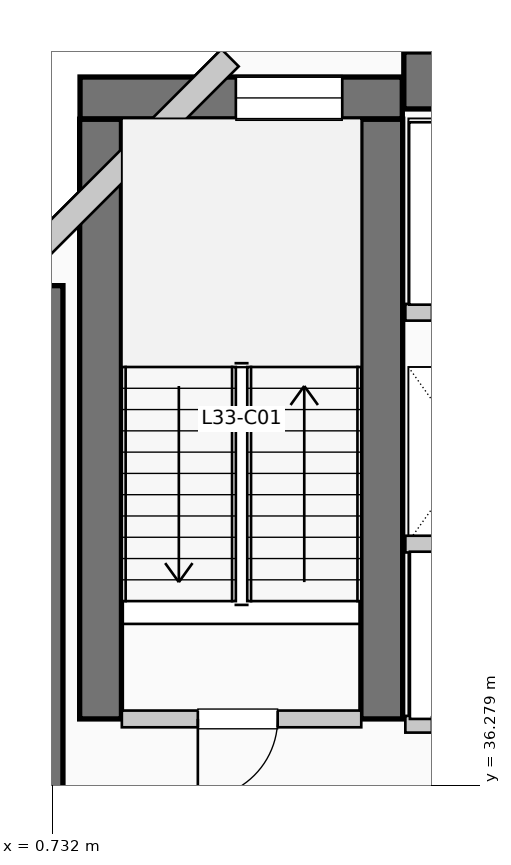
"""IFC4 building model, lengths in metres.
Left out: names, types, materials, properties, quantities, classifications, styles, units other than length and angle.
Written with IfcOpenShell. Run it as: python <this file> out.ifc"""

import sys

from ifc_helpers import new_model, si_unit, direction, frame, frame_2d, origin, place, context, subcontext, project, spatial, rectangle, extrude, element, fill, save


model = new_model("IFC4")
c1 = context("Model", 3, precision=1e-05, world=origin(), true_north=direction((0.0, 1.0)))
c2 = subcontext(c1, "Body", "Model", "MODEL_VIEW")
j1 = project(units=[si_unit("LENGTHUNIT", "METRE"), si_unit("PLANEANGLEUNIT", "RADIAN")], contexts=[c1])
p1 = place(None, origin())
s1 = spatial("IfcSite", under=j1, at=p1, CompositionType="ELEMENT")
p2 = place(p1, origin())
s2 = spatial("IfcBuilding", under=s1, at=p2, CompositionType="ELEMENT")
p3 = place(p2, frame((0.0, 0.0, 138.93)))
s3 = spatial("IfcBuildingStorey", under=s2, at=p3, CompositionType="ELEMENT", Elevation=138.93)
p4 = place(p3, frame((5.36, 45.55, 0.0), z_axis=(0.0, 0.0, 1.0), x_axis=(1.0, 0.0, 0.0)))
e1 = element("IfcWall", 1, at=p4, inside=s3, PredefinedType="SHEAR", context=c2, shape_type="SweptSolid", body=[
    extrude(rectangle(XDim=13.98, YDim=0.75, at=frame_2d((6.99, 0.0))), origin(), (0.0, 0.0, 1.0), 3.96),
])
p5 = place(p3, frame((0.5, 34.95, 0.0), z_axis=(0.0, 0.0, 1.0), x_axis=(0.0, 1.0, 0.0)))
e2 = element("IfcWall", 2, at=p5, inside=s3, PredefinedType="SHEAR", context=c2, shape_type="SweptSolid", body=[
    extrude(rectangle(XDim=7.9, YDim=0.75, at=frame_2d((3.95, 0.0))), origin(), (0.0, 0.0, 1.0), 3.96),
])
for number, where, z_axis, x_axis in (
    (3, (1.37, 37.15, 0.0), (0.0, 0.0, 1.0), (0.0, 1.0, 0.0)),
    (4, (5.07, 37.15, 0.0), (0.0, 0.0, 1.0), (0.0, 1.0, 0.0)),
):
    element("IfcWall", number, at=place(p3, frame(where, z_axis=z_axis, x_axis=x_axis)), inside=s3, PredefinedType="SHEAR", context=c2, shape_type="SweptSolid", body=[
        extrude(rectangle(XDim=7.89, YDim=0.55, at=frame_2d((3.945, 0.0))), origin(), (0.0, 0.0, 1.0), 3.96),
    ])
p6 = place(p3, frame((1.1, 45.32, 0.0), z_axis=(0.0, 0.0, 1.0), x_axis=(1.0, 0.0, 0.0)))
e5 = element("IfcWall", 5, at=p6, inside=s3, PredefinedType="SHEAR", context=c2, shape_type="SweptSolid", body=[
    extrude(rectangle(XDim=4.24, YDim=0.55, at=frame_2d((2.12, 0.0))), origin(), (0.0, 0.0, 1.0), 3.96),
])
p7 = place(p6, frame((2.05, 0.0, 1.05)))
e6 = element("IfcOpeningElement", 6, at=p7, cuts=e5, PredefinedType="OPENING", context=c2, shape_type="SweptSolid", body=[
    extrude(rectangle(XDim=1.4, YDim=1.8, at=frame_2d((0.7, 0.9))), frame((0.0, 0.285, 0.0), z_axis=(0.0, -1.0, 0.0), x_axis=(1.0, 0.0, 0.0)), (0.0, 0.0, 1.0), 0.57),
])
p8 = place(p3, frame((3.074, 45.848, 0.0), z_axis=(0.0, 0.0, 1.0), x_axis=(-0.707106781187, -0.707106781187, 0.0)))
e7 = element("IfcWall", 7, at=p8, inside=s3, PredefinedType="SOLIDWALL", context=c2, shape_type="SweptSolid", body=[
    extrude(rectangle(XDim=4.133, YDim=0.32, at=frame_2d((2.066, 0.0))), origin(), (0.0, 0.0, 1.0), 3.71),
])
p9 = place(p3, frame((1.65, 37.15, 0.0), z_axis=(0.0, 0.0, 1.0), x_axis=(1.0, 0.0, 0.0)))
e8 = element("IfcWall", 8, at=p9, inside=s3, PredefinedType="PARTITIONING", context=c2, shape_type="SweptSolid", body=[
    extrude(rectangle(XDim=3.15, YDim=0.22, at=frame_2d((1.575, 0.0))), origin(), (0.0, 0.0, 1.0), 3.71),
])
p10 = place(p9, frame((2.05, 0.0, 0.0), z_axis=(0.0, 0.0, 1.0), x_axis=(-1.0, 0.0, 0.0)))
e9 = element("IfcOpeningElement", 9, at=p10, cuts=e8, PredefinedType="OPENING", context=c2, shape_type="SweptSolid", body=[
    extrude(rectangle(XDim=1.05, YDim=2.15, at=frame_2d((0.525, 1.075))), frame((0.0, 0.12, 0.0), z_axis=(0.0, -1.0, 0.0), x_axis=(1.0, 0.0, 0.0)), (0.0, 0.0, 1.0), 0.24),
])
p11 = place(p3, frame((5.38, 37.08, 0.0), z_axis=(0.0, 0.0, 1.0), x_axis=(1.0, 0.0, 0.0)))
e10 = element("IfcWall", 10, at=p11, inside=s3, PredefinedType="PARTITIONING", context=c2, shape_type="SweptSolid", body=[
    extrude(rectangle(XDim=3.46, YDim=0.22, at=frame_2d((1.73, 0.0))), origin(), (0.0, 0.0, 1.0), 3.71),
])
p12 = place(p11, frame((1.55, 0.0, 0.0), z_axis=(0.0, 0.0, 1.0), x_axis=(-1.0, 0.0, 0.0)))
e11 = element("IfcOpeningElement", 11, at=p12, cuts=e10, PredefinedType="OPENING", context=c2, shape_type="SweptSolid", body=[
    extrude(rectangle(XDim=1.2, YDim=2.2, at=frame_2d((0.6, 1.1))), frame((0.0, 0.12, 0.0), z_axis=(0.0, -1.0, 0.0), x_axis=(1.0, 0.0, 0.0)), (0.0, 0.0, 1.0), 0.24),
])
p13 = place(p11, frame((3.22, 0.0, 0.0), z_axis=(0.0, 0.0, 1.0), x_axis=(-1.0, 0.0, 0.0)))
e12 = element("IfcOpeningElement", 12, at=p13, cuts=e10, PredefinedType="OPENING", context=c2, shape_type="SweptSolid", body=[
    extrude(rectangle(XDim=1.2, YDim=2.2, at=frame_2d((0.6, 1.1))), frame((0.0, 0.12, 0.0), z_axis=(0.0, -1.0, 0.0), x_axis=(1.0, 0.0, 0.0)), (0.0, 0.0, 1.0), 0.24),
])
p14 = place(p3, frame((5.38, 39.45, 0.0), z_axis=(0.0, 0.0, 1.0), x_axis=(1.0, 0.0, 0.0)))
e13 = element("IfcWall", 13, at=p14, inside=s3, PredefinedType="PARTITIONING", context=c2, shape_type="SweptSolid", body=[
    extrude(rectangle(XDim=3.46, YDim=0.22, at=frame_2d((1.73, 0.0))), origin(), (0.0, 0.0, 1.0), 3.71),
])
p15 = place(p3, frame((5.38, 42.5, 0.0), z_axis=(0.0, 0.0, 1.0), x_axis=(1.0, 0.0, 0.0)))
e14 = element("IfcWall", 14, at=p15, inside=s3, PredefinedType="PARTITIONING", context=c2, shape_type="SweptSolid", body=[
    extrude(rectangle(XDim=3.77, YDim=0.22, at=frame_2d((1.885, 0.0))), origin(), (0.0, 0.0, 1.0), 3.71),
])
p16 = place(p15, frame((1.75, 0.0, 0.0), z_axis=(0.0, 0.0, 1.0), x_axis=(-1.0, 0.0, 0.0)))
e15 = element("IfcOpeningElement", 15, at=p16, cuts=e14, PredefinedType="OPENING", context=c2, shape_type="SweptSolid", body=[
    extrude(rectangle(XDim=1.4, YDim=2.2, at=frame_2d((0.7, 1.1))), frame((0.0, 0.12, 0.0), z_axis=(0.0, -1.0, 0.0), x_axis=(1.0, 0.0, 0.0)), (0.0, 0.0, 1.0), 0.24),
])
p17 = place(p15, frame((3.53, 0.0, 0.0), z_axis=(0.0, 0.0, 1.0), x_axis=(-1.0, 0.0, 0.0)))
e16 = element("IfcOpeningElement", 16, at=p17, cuts=e14, PredefinedType="OPENING", context=c2, shape_type="SweptSolid", body=[
    extrude(rectangle(XDim=1.4, YDim=2.2, at=frame_2d((0.7, 1.1))), frame((0.0, 0.12, 0.0), z_axis=(0.0, -1.0, 0.0), x_axis=(1.0, 0.0, 0.0)), (0.0, 0.0, 1.0), 0.24),
])
p18 = place(p7, origin())
e17 = element("IfcWindow", 17, at=p18, inside=s3, PartitioningType="SINGLE_PANEL", PredefinedType="WINDOW", context=c2, shape_type="SweptSolid", body=[
    extrude(rectangle(XDim=1.4, YDim=1.8, at=frame_2d((0.7, 0.9))), frame((0.0, 0.03, 0.0), z_axis=(0.0, -1.0, 0.0), x_axis=(1.0, 0.0, 0.0)), (0.0, 0.0, 1.0), 0.06),
])
fill(e6, e17)
p19 = place(p10, origin())
e18 = element("IfcDoor", 18, at=p19, inside=s3, OperationType="SINGLE_SWING_LEFT", PredefinedType="DOOR", context=c2, shape_type="SweptSolid", body=[
    extrude(rectangle(XDim=1.05, YDim=2.15, at=frame_2d((0.525, 1.075))), frame((0.0, 0.025, 0.0), z_axis=(0.0, -1.0, 0.0), x_axis=(1.0, 0.0, 0.0)), (0.0, 0.0, 1.0), 0.05),
])
fill(e9, e18)
save(model, sys.argv[1])
